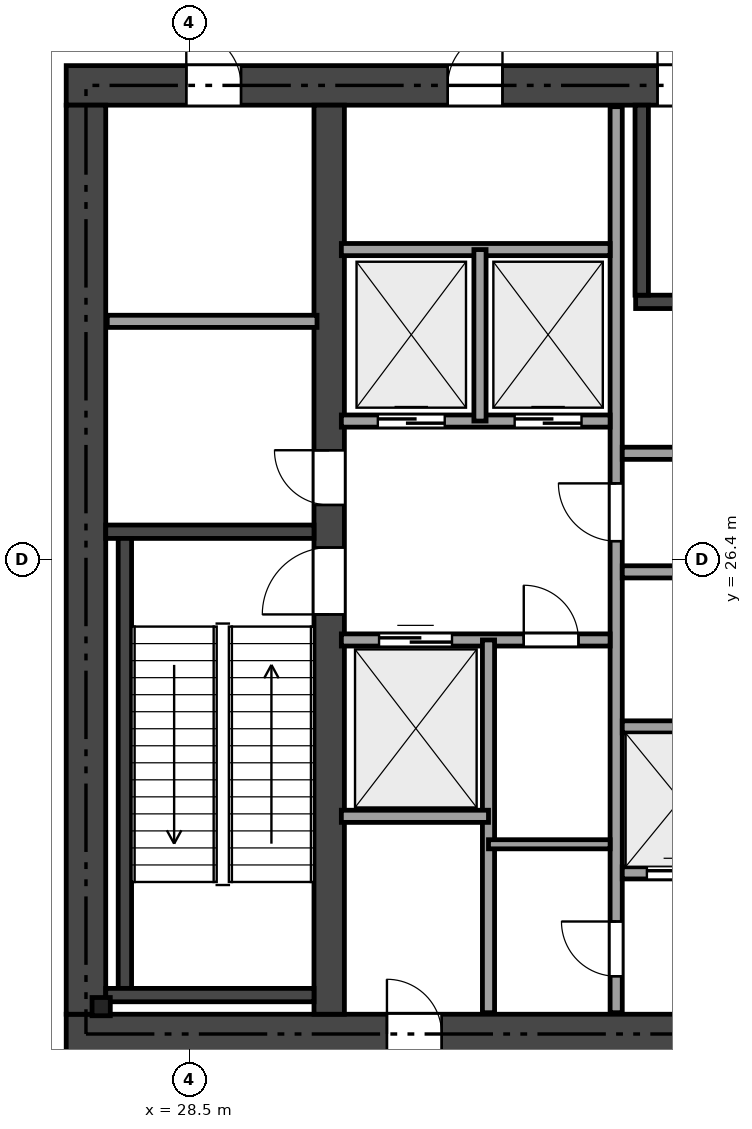
"""IFC4 building model, lengths in metres.
Left out: names, types, materials, properties, quantities, classifications, styles, units other than length and angle.
Written with IfcOpenShell. Run it as: python <this file> out.ifc"""

import sys

from ifc_helpers import new_model, si_unit, direction, frame, frame_2d, origin, origin_2d, place, context, subcontext, project, spatial, rectangle, i_section, extrude, element, fill, save


model = new_model("IFC4")
c1 = context("Model", 3, precision=1e-05, world=origin(), true_north=direction((0.0, 1.0)))
c2 = subcontext(c1, "Body", "Model", "MODEL_VIEW")
j1 = project(units=[si_unit("LENGTHUNIT", "METRE"), si_unit("PLANEANGLEUNIT", "RADIAN")], contexts=[c1])
p1 = place(None, origin())
s1 = spatial("IfcSite", under=j1, at=p1, CompositionType="ELEMENT")
p2 = place(p1, origin())
s2 = spatial("IfcBuilding", under=s1, at=p2, CompositionType="ELEMENT")
p3 = place(p2, frame((0.0, 0.0, -5.4)))
s3 = spatial("IfcBuildingStorey", under=s2, at=p3, CompositionType="ELEMENT", Elevation=-5.4)
p4 = place(p3, frame((26.475, 18.6, 0.0), z_axis=(0.0, 0.0, 1.0), x_axis=(1.0, 0.0, 0.0)))
e1 = element("IfcWall", 1, at=p4, inside=s3, PredefinedType="SHEAR", context=c2, shape_type="SweptSolid", body=[
    extrude(rectangle(XDim=21.45, YDim=0.65, at=frame_2d((10.725, 0.0))), origin(), (0.0, 0.0, 1.0), 5.05),
])
p5 = place(p4, frame((12.45, 0.0, 0.0)))
e2 = element("IfcOpeningElement", 2, at=p5, cuts=e1, PredefinedType="OPENING", context=c2, shape_type="SweptSolid", body=[
    extrude(rectangle(XDim=1.15, YDim=2.15, at=frame_2d((0.575, 1.075))), frame((0.0, 0.335, 0.0), z_axis=(0.0, -1.0, 0.0), x_axis=(1.0, 0.0, 0.0)), (0.0, 0.0, 1.0), 0.67),
])
p6 = place(p4, frame((5.275, 0.0, 0.0)))
e3 = element("IfcOpeningElement", 3, at=p6, cuts=e1, PredefinedType="OPENING", context=c2, shape_type="SweptSolid", body=[
    extrude(rectangle(XDim=0.9, YDim=2.1, at=frame_2d((0.45, 1.05))), frame((0.0, 0.335, 0.0), z_axis=(0.0, -1.0, 0.0), x_axis=(1.0, 0.0, 0.0)), (0.0, 0.0, 1.0), 0.67),
])
p7 = place(p3, frame((26.475, 34.2, 0.0), z_axis=(0.0, 0.0, 1.0), x_axis=(1.0, 0.0, 0.0)))
e4 = element("IfcWall", 4, at=p7, inside=s3, PredefinedType="SHEAR", context=c2, shape_type="SweptSolid", body=[
    extrude(rectangle(XDim=21.45, YDim=0.65, at=frame_2d((10.725, 0.0))), origin(), (0.0, 0.0, 1.0), 5.05),
])
p8 = place(p7, frame((9.725, 0.0, 0.0)))
e5 = element("IfcOpeningElement", 5, at=p8, cuts=e4, PredefinedType="OPENING", context=c2, shape_type="SweptSolid", body=[
    extrude(rectangle(XDim=1.1, YDim=2.15, at=frame_2d((0.55, 1.075))), frame((0.0, 0.335, 0.0), z_axis=(0.0, -1.0, 0.0), x_axis=(1.0, 0.0, 0.0)), (0.0, 0.0, 1.0), 0.67),
])
p9 = place(p7, frame((1.975, 0.0, 0.0)))
e6 = element("IfcOpeningElement", 6, at=p9, cuts=e4, PredefinedType="OPENING", context=c2, shape_type="SweptSolid", body=[
    extrude(rectangle(XDim=0.9, YDim=2.1, at=frame_2d((0.45, 1.05))), frame((0.0, 0.335, 0.0), z_axis=(0.0, -1.0, 0.0), x_axis=(1.0, 0.0, 0.0)), (0.0, 0.0, 1.0), 0.67),
])
p10 = place(p7, frame((6.275, 0.0, 0.0)))
e7 = element("IfcOpeningElement", 7, at=p10, cuts=e4, PredefinedType="OPENING", context=c2, shape_type="SweptSolid", body=[
    extrude(rectangle(XDim=0.9, YDim=2.1, at=frame_2d((0.45, 1.05))), frame((0.0, 0.335, 0.0), z_axis=(0.0, -1.0, 0.0), x_axis=(1.0, 0.0, 0.0)), (0.0, 0.0, 1.0), 0.67),
])
p11 = place(p3, frame((26.8, 18.925, 0.0), z_axis=(0.0, 0.0, 1.0), x_axis=(0.0, 1.0, 0.0)))
e8 = element("IfcWall", 8, at=p11, inside=s3, PredefinedType="SHEAR", context=c2, shape_type="SweptSolid", body=[
    extrude(rectangle(XDim=14.95, YDim=0.65, at=frame_2d((7.475, 0.0))), origin(), (0.0, 0.0, 1.0), 5.05),
])
p12 = place(p3, frame((30.8, 18.925, 0.0), z_axis=(0.0, 0.0, 1.0), x_axis=(0.0, 1.0, 0.0)))
e9 = element("IfcWall", 9, at=p12, inside=s3, PredefinedType="SHEAR", context=c2, shape_type="SweptSolid", body=[
    extrude(rectangle(XDim=14.95, YDim=0.5, at=frame_2d((7.475, 0.0))), origin(), (0.0, 0.0, 1.0), 5.05),
])
p13 = place(p12, frame((6.575, 0.0, 0.0)))
e10 = element("IfcOpeningElement", 10, at=p13, cuts=e9, PredefinedType="OPENING", context=c2, shape_type="SweptSolid", body=[
    extrude(rectangle(XDim=1.1, YDim=2.15, at=frame_2d((0.55, 1.075))), frame((0.0, 0.26, 0.0), z_axis=(0.0, -1.0, 0.0), x_axis=(1.0, 0.0, 0.0)), (0.0, 0.0, 1.0), 0.52),
])
p14 = place(p12, frame((8.375, 0.0, 0.0)))
e11 = element("IfcOpeningElement", 11, at=p14, cuts=e9, PredefinedType="OPENING", context=c2, shape_type="SweptSolid", body=[
    extrude(rectangle(XDim=0.9, YDim=2.1, at=frame_2d((0.45, 1.05))), frame((0.0, 0.26, 0.0), z_axis=(0.0, -1.0, 0.0), x_axis=(1.0, 0.0, 0.0)), (0.0, 0.0, 1.0), 0.52),
])
p15 = place(p3, frame((27.125, 26.86, 0.0), z_axis=(0.0, 0.0, 1.0), x_axis=(1.0, 0.0, 0.0)))
e12 = element("IfcWall", 12, at=p15, inside=s3, PredefinedType="SHEAR", context=c2, shape_type="SweptSolid", body=[
    extrude(rectangle(XDim=3.425, YDim=0.22, at=frame_2d((1.712, 0.0))), origin(), (0.0, 0.0, 1.0), 5.05),
])
p16 = place(p3, frame((27.44, 19.35, 0.0), z_axis=(0.0, 0.0, 1.0), x_axis=(0.0, 1.0, 0.0)))
e13 = element("IfcWall", 13, at=p16, inside=s3, PredefinedType="SHEAR", context=c2, shape_type="SweptSolid", body=[
    extrude(rectangle(XDim=7.4, YDim=0.22, at=frame_2d((3.7, 0.0))), origin(), (0.0, 0.0, 1.0), 5.05),
])
p17 = place(p3, frame((27.125, 19.24, 0.0), z_axis=(0.0, 0.0, 1.0), x_axis=(1.0, 0.0, 0.0)))
e14 = element("IfcWall", 14, at=p17, inside=s3, PredefinedType="SHEAR", context=c2, shape_type="SweptSolid", body=[
    extrude(rectangle(XDim=3.425, YDim=0.22, at=frame_2d((1.712, 0.0))), origin(), (0.0, 0.0, 1.0), 5.05),
])
p18 = place(p3, frame((35.84, 30.64, 0.0), z_axis=(0.0, 0.0, 1.0), x_axis=(1.0, 0.0, 0.0)))
e15 = element("IfcWall", 15, at=p18, inside=s3, PredefinedType="SHEAR", context=c2, shape_type="SweptSolid", body=[
    extrude(rectangle(XDim=7.61, YDim=0.22, at=frame_2d((3.805, 0.0))), origin(), (0.0, 0.0, 1.0), 5.05),
])
p19 = place(p3, frame((35.94, 30.75, 0.0), z_axis=(0.0, 0.0, 1.0), x_axis=(0.0, 1.0, 0.0)))
e16 = element("IfcWall", 16, at=p19, inside=s3, PredefinedType="SHEAR", context=c2, shape_type="SweptSolid", body=[
    extrude(rectangle(XDim=3.125, YDim=0.22, at=frame_2d((1.562, 0.0))), origin(), (0.0, 0.0, 1.0), 5.05),
])
p20 = place(p3, frame((27.05, 19.05, 0.0), z_axis=(0.0, 0.0, 1.0), x_axis=(1.0, 0.0, 0.0)))
e17 = element("IfcColumn", 17, at=p20, inside=s3, PredefinedType="PILASTER", context=c2, shape_type="SweptSolid", body=[
    extrude(i_section(OverallWidth=0.3, OverallDepth=0.3, WebThickness=0.011, FlangeThickness=0.019, at=origin_2d()), origin(), (0.0, 0.0, 1.0), 5.05),
])
p21 = place(p3, frame((27.15, 30.32, 0.0), z_axis=(0.0, 0.0, 1.0), x_axis=(1.0, 0.0, 0.0)))
e18 = element("IfcWall", 18, at=p21, inside=s3, PredefinedType="SOLIDWALL", context=c2, shape_type="SweptSolid", body=[
    extrude(rectangle(XDim=3.45, YDim=0.2, at=frame_2d((1.725, 0.0))), origin(), (0.0, 0.0, 1.0), 5.05),
])
p22 = place(p3, frame((35.52, 18.95, 0.0), z_axis=(0.0, 0.0, 1.0), x_axis=(0.0, 1.0, 0.0)))
e19 = element("IfcWall", 19, at=p22, inside=s3, PredefinedType="SOLIDWALL", context=c2, shape_type="SweptSolid", body=[
    extrude(rectangle(XDim=14.9, YDim=0.2, at=frame_2d((7.45, 0.0))), origin(), (0.0, 0.0, 1.0), 4.571),
])
p23 = place(p22, frame((7.755, 0.0, 0.0)))
e20 = element("IfcOpeningElement", 20, at=p23, cuts=e19, PredefinedType="OPENING", context=c2, shape_type="SweptSolid", body=[
    extrude(rectangle(XDim=0.95, YDim=2.15, at=frame_2d((0.475, 1.075))), frame((0.0, 0.11, 0.0), z_axis=(0.0, -1.0, 0.0), x_axis=(1.0, 0.0, 0.0)), (0.0, 0.0, 1.0), 0.22),
])
p24 = place(p22, frame((0.6, 0.0, 0.0)))
e21 = element("IfcOpeningElement", 21, at=p24, cuts=e19, PredefinedType="OPENING", context=c2, shape_type="SweptSolid", body=[
    extrude(rectangle(XDim=0.9, YDim=2.1, at=frame_2d((0.45, 1.05))), frame((0.0, 0.11, 0.0), z_axis=(0.0, -1.0, 0.0), x_axis=(1.0, 0.0, 0.0)), (0.0, 0.0, 1.0), 0.22),
])
p25 = place(p3, frame((31.0, 28.68, 0.0), z_axis=(0.0, 0.0, 1.0), x_axis=(1.0, 0.0, 0.0)))
e22 = element("IfcWall", 22, at=p25, inside=s3, PredefinedType="SOLIDWALL", context=c2, shape_type="SweptSolid", body=[
    extrude(rectangle(XDim=4.42, YDim=0.2, at=frame_2d((2.21, 0.0))), origin(), (0.0, 0.0, 1.0), 5.05),
])
p26 = place(p25, frame((0.6, 0.0, 0.0)))
e23 = element("IfcOpeningElement", 23, at=p26, cuts=e22, PredefinedType="OPENING", context=c2, shape_type="SweptSolid", body=[
    extrude(rectangle(XDim=1.1, YDim=2.15, at=frame_2d((0.55, 1.075))), frame((0.0, 0.11, 0.0), z_axis=(0.0, -1.0, 0.0), x_axis=(1.0, 0.0, 0.0)), (0.0, 0.0, 1.0), 0.22),
])
p27 = place(p25, frame((2.85, 0.0, 0.0)))
e24 = element("IfcOpeningElement", 24, at=p27, cuts=e22, PredefinedType="OPENING", context=c2, shape_type="SweptSolid", body=[
    extrude(rectangle(XDim=1.1, YDim=2.15, at=frame_2d((0.55, 1.075))), frame((0.0, 0.11, 0.0), z_axis=(0.0, -1.0, 0.0), x_axis=(1.0, 0.0, 0.0)), (0.0, 0.0, 1.0), 0.22),
])
p28 = place(p3, frame((31.0, 31.5, 0.0), z_axis=(0.0, 0.0, 1.0), x_axis=(1.0, 0.0, 0.0)))
e25 = element("IfcWall", 25, at=p28, inside=s3, PredefinedType="SOLIDWALL", context=c2, shape_type="SweptSolid", body=[
    extrude(rectangle(XDim=4.42, YDim=0.2, at=frame_2d((2.21, 0.0))), origin(), (0.0, 0.0, 1.0), 5.05),
])
p29 = place(p3, frame((33.28, 28.68, 0.0), z_axis=(0.0, 0.0, 1.0), x_axis=(0.0, 1.0, 0.0)))
e26 = element("IfcWall", 26, at=p29, inside=s3, PredefinedType="SOLIDWALL", context=c2, shape_type="SweptSolid", body=[
    extrude(rectangle(XDim=2.82, YDim=0.2, at=frame_2d((1.41, 0.0))), origin(), (0.0, 0.0, 1.0), 5.05),
])
p30 = place(p3, frame((31.0, 25.08, 0.0), z_axis=(0.0, 0.0, 1.0), x_axis=(1.0, 0.0, 0.0)))
e27 = element("IfcWall", 27, at=p30, inside=s3, PredefinedType="SOLIDWALL", context=c2, shape_type="SweptSolid", body=[
    extrude(rectangle(XDim=4.42, YDim=0.2, at=frame_2d((2.21, 0.0))), origin(), (0.0, 0.0, 1.0), 5.05),
])
p31 = place(p30, frame((3.0, 0.0, 0.0)))
e28 = element("IfcOpeningElement", 28, at=p31, cuts=e27, PredefinedType="OPENING", context=c2, shape_type="SweptSolid", body=[
    extrude(rectangle(XDim=0.9, YDim=2.1, at=frame_2d((0.45, 1.05))), frame((0.0, 0.11, 0.0), z_axis=(0.0, -1.0, 0.0), x_axis=(1.0, 0.0, 0.0)), (0.0, 0.0, 1.0), 0.22),
])
p32 = place(p30, frame((0.62, 0.0, 0.0)))
e29 = element("IfcOpeningElement", 29, at=p32, cuts=e27, PredefinedType="OPENING", context=c2, shape_type="SweptSolid", body=[
    extrude(rectangle(XDim=1.2, YDim=2.15, at=frame_2d((0.6, 1.075))), frame((0.0, 0.11, 0.0), z_axis=(0.0, -1.0, 0.0), x_axis=(1.0, 0.0, 0.0)), (0.0, 0.0, 1.0), 0.22),
])
p33 = place(p3, frame((33.42, 18.95, 0.0), z_axis=(0.0, 0.0, 1.0), x_axis=(0.0, 1.0, 0.0)))
e30 = element("IfcWall", 30, at=p33, inside=s3, PredefinedType="SOLIDWALL", context=c2, shape_type="SweptSolid", body=[
    extrude(rectangle(XDim=6.13, YDim=0.2, at=frame_2d((3.065, 0.0))), origin(), (0.0, 0.0, 1.0), 4.571),
])
p34 = place(p3, frame((31.0, 22.18, 0.0), z_axis=(0.0, 0.0, 1.0), x_axis=(1.0, 0.0, 0.0)))
e31 = element("IfcWall", 31, at=p34, inside=s3, PredefinedType="SOLIDWALL", context=c2, shape_type="SweptSolid", body=[
    extrude(rectangle(XDim=2.42, YDim=0.2, at=frame_2d((1.21, 0.0))), origin(), (0.0, 0.0, 1.0), 5.05),
])
p35 = place(p3, frame((33.42, 21.72, 0.0), z_axis=(0.0, 0.0, 1.0), x_axis=(1.0, 0.0, 0.0)))
e32 = element("IfcWall", 32, at=p35, inside=s3, PredefinedType="PARTITIONING", context=c2, shape_type="SweptSolid", body=[
    extrude(rectangle(XDim=2.0, YDim=0.15, at=frame_2d((1.0, 0.0))), origin(), (0.0, 0.0, 1.0), 5.05),
])
for number, where, z_axis, x_axis in (
    (33, (35.62, 28.15, 0.0), (0.0, 0.0, 1.0), (1.0, 0.0, 0.0)),
    (34, (35.62, 26.2, 0.0), (0.0, 0.0, 1.0), (1.0, 0.0, 0.0)),
):
    element("IfcWall", number, at=place(p3, frame(where, z_axis=z_axis, x_axis=x_axis)), inside=s3, PredefinedType="SOLIDWALL", context=c2, shape_type="SweptSolid", body=[
        extrude(rectangle(XDim=7.88, YDim=0.2, at=frame_2d((3.94, 0.0))), origin(), (0.0, 0.0, 1.0), 5.05),
    ])
p36 = place(p3, frame((35.62, 23.65, 0.0), z_axis=(0.0, 0.0, 1.0), x_axis=(1.0, 0.0, 0.0)))
e35 = element("IfcWall", 35, at=p36, inside=s3, PredefinedType="SOLIDWALL", context=c2, shape_type="SweptSolid", body=[
    extrude(rectangle(XDim=7.88, YDim=0.2, at=frame_2d((3.94, 0.0))), origin(), (0.0, 0.0, 1.0), 4.571),
])
p37 = place(p3, frame((35.62, 21.25, 0.0), z_axis=(0.0, 0.0, 1.0), x_axis=(1.0, 0.0, 0.0)))
e36 = element("IfcWall", 36, at=p37, inside=s3, PredefinedType="SOLIDWALL", context=c2, shape_type="SweptSolid", body=[
    extrude(rectangle(XDim=7.88, YDim=0.2, at=frame_2d((3.94, 0.0))), origin(), (0.0, 0.0, 1.0), 5.05),
])
p38 = place(p37, frame((0.405, 0.0, 0.0)))
e37 = element("IfcOpeningElement", 37, at=p38, cuts=e36, PredefinedType="OPENING", context=c2, shape_type="SweptSolid", body=[
    extrude(rectangle(XDim=1.1, YDim=2.15, at=frame_2d((0.55, 1.075))), frame((0.0, 0.11, 0.0), z_axis=(0.0, -1.0, 0.0), x_axis=(1.0, 0.0, 0.0)), (0.0, 0.0, 1.0), 0.22),
])
p39 = place(p37, frame((2.355, 0.0, 0.0)))
e38 = element("IfcOpeningElement", 38, at=p39, cuts=e36, PredefinedType="OPENING", context=c2, shape_type="SweptSolid", body=[
    extrude(rectangle(XDim=1.1, YDim=2.15, at=frame_2d((0.55, 1.075))), frame((0.0, 0.11, 0.0), z_axis=(0.0, -1.0, 0.0), x_axis=(1.0, 0.0, 0.0)), (0.0, 0.0, 1.0), 0.22),
])
p40 = place(p37, frame((4.305, 0.0, 0.0)))
e39 = element("IfcOpeningElement", 39, at=p40, cuts=e36, PredefinedType="OPENING", context=c2, shape_type="SweptSolid", body=[
    extrude(rectangle(XDim=1.1, YDim=2.15, at=frame_2d((0.55, 1.075))), frame((0.0, 0.11, 0.0), z_axis=(0.0, -1.0, 0.0), x_axis=(1.0, 0.0, 0.0)), (0.0, 0.0, 1.0), 0.22),
])
p41 = place(p37, frame((6.255, 0.0, 0.0)))
e40 = element("IfcOpeningElement", 40, at=p41, cuts=e36, PredefinedType="OPENING", context=c2, shape_type="SweptSolid", body=[
    extrude(rectangle(XDim=1.1, YDim=2.15, at=frame_2d((0.55, 1.075))), frame((0.0, 0.11, 0.0), z_axis=(0.0, -1.0, 0.0), x_axis=(1.0, 0.0, 0.0)), (0.0, 0.0, 1.0), 0.22),
])
p42 = place(p13, origin())
e41 = element("IfcDoor", 41, at=p42, inside=s3, OperationType="SINGLE_SWING_LEFT", PredefinedType="DOOR", context=c2, shape_type="SweptSolid", body=[
    extrude(rectangle(XDim=1.1, YDim=2.15, at=frame_2d((0.55, 1.075))), frame((0.0, 0.025, 0.0), z_axis=(0.0, -1.0, 0.0), x_axis=(1.0, 0.0, 0.0)), (0.0, 0.0, 1.0), 0.05),
])
fill(e10, e41)
p43 = place(p8, origin())
e42 = element("IfcDoor", 42, at=p43, inside=s3, OperationType="SINGLE_SWING_LEFT", PredefinedType="DOOR", context=c2, shape_type="SweptSolid", body=[
    extrude(rectangle(XDim=1.1, YDim=2.15, at=frame_2d((0.55, 1.075))), frame((0.0, 0.025, 0.0), z_axis=(0.0, -1.0, 0.0), x_axis=(1.0, 0.0, 0.0)), (0.0, 0.0, 1.0), 0.05),
])
fill(e5, e42)
p44 = place(p23, origin())
e43 = element("IfcDoor", 43, at=p44, inside=s3, OperationType="SINGLE_SWING_RIGHT", PredefinedType="DOOR", context=c2, shape_type="SweptSolid", body=[
    extrude(rectangle(XDim=0.95, YDim=2.15, at=frame_2d((0.475, 1.075))), frame((0.0, 0.025, 0.0), z_axis=(0.0, -1.0, 0.0), x_axis=(1.0, 0.0, 0.0)), (0.0, 0.0, 1.0), 0.05),
])
fill(e20, e43)
p45 = place(p14, origin())
e44 = element("IfcDoor", 44, at=p45, inside=s3, OperationType="SINGLE_SWING_RIGHT", PredefinedType="DOOR", context=c2, shape_type="SweptSolid", body=[
    extrude(rectangle(XDim=0.9, YDim=2.1, at=frame_2d((0.45, 1.05))), frame((0.0, 0.025, 0.0), z_axis=(0.0, -1.0, 0.0), x_axis=(1.0, 0.0, 0.0)), (0.0, 0.0, 1.0), 0.05),
])
fill(e11, e44)
p46 = place(p9, origin())
e45 = element("IfcDoor", 45, at=p46, inside=s3, OperationType="SINGLE_SWING_LEFT", PredefinedType="DOOR", context=c2, shape_type="SweptSolid", body=[
    extrude(rectangle(XDim=0.9, YDim=2.1, at=frame_2d((0.45, 1.05))), frame((0.0, 0.025, 0.0), z_axis=(0.0, -1.0, 0.0), x_axis=(1.0, 0.0, 0.0)), (0.0, 0.0, 1.0), 0.05),
])
fill(e6, e45)
p47 = place(p10, origin())
e46 = element("IfcDoor", 46, at=p47, inside=s3, OperationType="SINGLE_SWING_RIGHT", PredefinedType="DOOR", context=c2, shape_type="SweptSolid", body=[
    extrude(rectangle(XDim=0.9, YDim=2.1, at=frame_2d((0.45, 1.05))), frame((0.0, 0.025, 0.0), z_axis=(0.0, -1.0, 0.0), x_axis=(1.0, 0.0, 0.0)), (0.0, 0.0, 1.0), 0.05),
])
fill(e7, e46)
p48 = place(p6, origin())
e47 = element("IfcDoor", 47, at=p48, inside=s3, OperationType="SINGLE_SWING_LEFT", PredefinedType="DOOR", context=c2, shape_type="SweptSolid", body=[
    extrude(rectangle(XDim=0.9, YDim=2.1, at=frame_2d((0.45, 1.05))), frame((0.0, 0.025, 0.0), z_axis=(0.0, -1.0, 0.0), x_axis=(1.0, 0.0, 0.0)), (0.0, 0.0, 1.0), 0.05),
])
fill(e3, e47)
p49 = place(p24, origin())
e48 = element("IfcDoor", 48, at=p49, inside=s3, OperationType="SINGLE_SWING_RIGHT", PredefinedType="DOOR", context=c2, shape_type="SweptSolid", body=[
    extrude(rectangle(XDim=0.9, YDim=2.1, at=frame_2d((0.45, 1.05))), frame((0.0, 0.025, 0.0), z_axis=(0.0, -1.0, 0.0), x_axis=(1.0, 0.0, 0.0)), (0.0, 0.0, 1.0), 0.05),
])
fill(e21, e48)
p50 = place(p31, origin())
e49 = element("IfcDoor", 49, at=p50, inside=s3, OperationType="SINGLE_SWING_LEFT", PredefinedType="DOOR", context=c2, shape_type="SweptSolid", body=[
    extrude(rectangle(XDim=0.9, YDim=2.1, at=frame_2d((0.45, 1.05))), frame((0.0, 0.025, 0.0), z_axis=(0.0, -1.0, 0.0), x_axis=(1.0, 0.0, 0.0)), (0.0, 0.0, 1.0), 0.05),
])
fill(e28, e49)
p51 = place(p26, origin())
e50 = element("IfcDoor", 50, at=p51, inside=s3, OperationType="SLIDING_TO_LEFT", PredefinedType="DOOR", context=c2, shape_type="SweptSolid", body=[
    extrude(rectangle(XDim=1.1, YDim=2.15, at=frame_2d((0.55, 1.075))), frame((0.0, 0.025, 0.0), z_axis=(0.0, -1.0, 0.0), x_axis=(1.0, 0.0, 0.0)), (0.0, 0.0, 1.0), 0.05),
])
fill(e23, e50)
p52 = place(p27, origin())
e51 = element("IfcDoor", 51, at=p52, inside=s3, OperationType="SLIDING_TO_LEFT", PredefinedType="DOOR", context=c2, shape_type="SweptSolid", body=[
    extrude(rectangle(XDim=1.1, YDim=2.15, at=frame_2d((0.55, 1.075))), frame((0.0, 0.025, 0.0), z_axis=(0.0, -1.0, 0.0), x_axis=(1.0, 0.0, 0.0)), (0.0, 0.0, 1.0), 0.05),
])
fill(e24, e51)
p53 = place(p32, origin())
e52 = element("IfcDoor", 52, at=p53, inside=s3, OperationType="SLIDING_TO_LEFT", PredefinedType="DOOR", context=c2, shape_type="SweptSolid", body=[
    extrude(rectangle(XDim=1.2, YDim=2.15, at=frame_2d((0.6, 1.075))), frame((0.0, 0.025, 0.0), z_axis=(0.0, -1.0, 0.0), x_axis=(1.0, 0.0, 0.0)), (0.0, 0.0, 1.0), 0.05),
])
fill(e29, e52)
p54 = place(p38, origin())
e53 = element("IfcDoor", 53, at=p54, inside=s3, OperationType="SLIDING_TO_LEFT", PredefinedType="DOOR", context=c2, shape_type="SweptSolid", body=[
    extrude(rectangle(XDim=1.1, YDim=2.15, at=frame_2d((0.55, 1.075))), frame((0.0, 0.025, 0.0), z_axis=(0.0, -1.0, 0.0), x_axis=(1.0, 0.0, 0.0)), (0.0, 0.0, 1.0), 0.05),
])
fill(e37, e53)
save(model, sys.argv[1])
